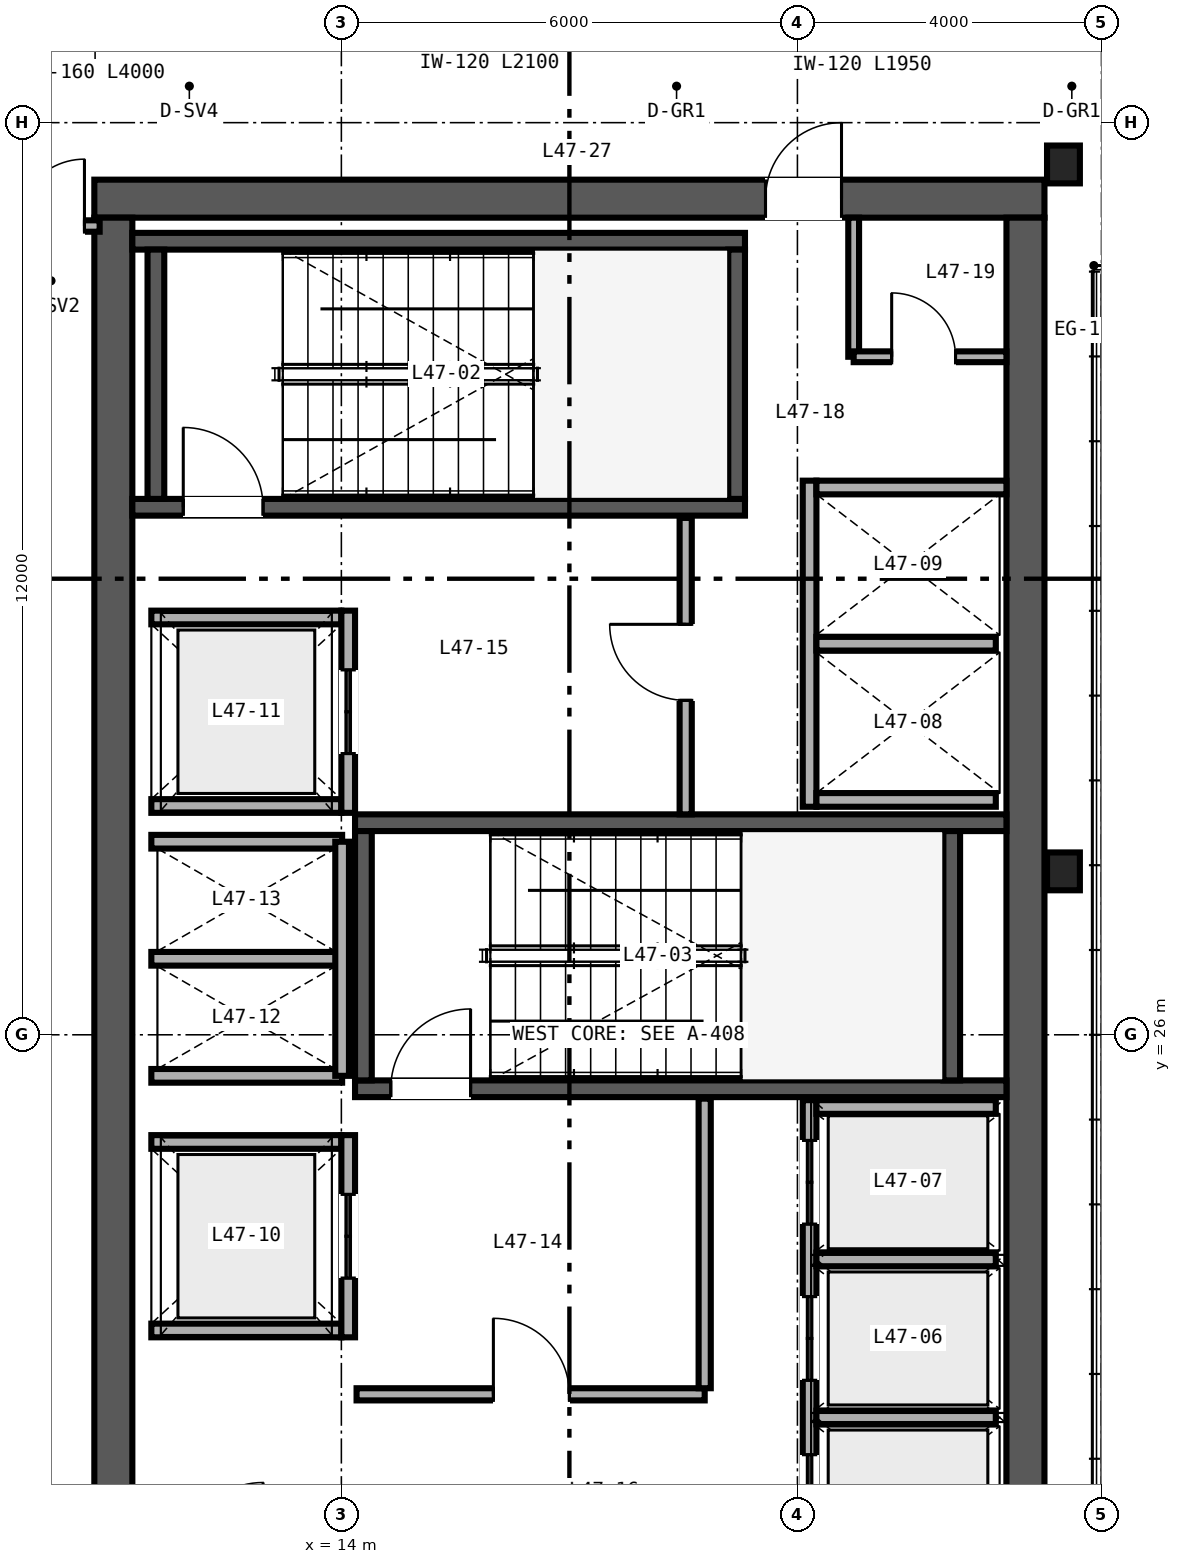
"""IFC4 building model, lengths in metres.
Left out: names, types, materials, properties, quantities, classifications, styles, units other than length and angle.
Written with IfcOpenShell. Run it as: python <this file> out.ifc"""

import sys

from ifc_helpers import new_model, si_unit, direction, frame, frame_2d, origin, origin_2d, place, context, subcontext, project, spatial, rectangle, i_section, extrude, source, transform, mapped, element, fill, save


model = new_model("IFC4")
c1 = context("Model", 3, precision=1e-05, world=origin(), true_north=direction((0.0, 1.0)))
c2 = subcontext(c1, "Body", "Model", "MODEL_VIEW")
j1 = project(units=[si_unit("LENGTHUNIT", "METRE"), si_unit("PLANEANGLEUNIT", "RADIAN")], contexts=[c1])
p1 = place(None, origin())
s1 = spatial("IfcSite", under=j1, at=p1, CompositionType="ELEMENT")
p2 = place(p1, origin())
s2 = spatial("IfcBuilding", under=s1, at=p2, CompositionType="ELEMENT")
p3 = place(p2, frame((0.0, 0.0, 188.4)))
s3 = spatial("IfcBuildingStorey", under=s2, at=p3, CompositionType="ELEMENT", Elevation=188.4)
p4 = place(p3, frame((10.75, 37.0, 0.0), z_axis=(0.0, 0.0, 1.0), x_axis=(1.0, 0.0, 0.0)))
e1 = element("IfcWall", 1, at=p4, inside=s3, PredefinedType="SHEAR", context=c2, shape_type="SweptSolid", body=[
    extrude(rectangle(XDim=12.5, YDim=0.5, at=frame_2d((6.25, 0.0))), origin(), (0.0, 0.0, 1.0), 3.37),
])
p5 = place(p4, frame((8.83, 0.0, 0.0)))
e2 = element("IfcOpeningElement", 2, at=p5, cuts=e1, PredefinedType="OPENING", context=c2, shape_type="SweptSolid", body=[
    extrude(rectangle(XDim=1.0, YDim=2.15, at=frame_2d((0.5, 1.075))), frame((0.0, 0.26, 0.0), z_axis=(0.0, -1.0, 0.0), x_axis=(1.0, 0.0, 0.0)), (0.0, 0.0, 1.0), 0.52),
])
for number, where, z_axis, x_axis in (
    (3, (11.0, 15.25, 0.0), (0.0, 0.0, 1.0), (0.0, 1.0, 0.0)),
    (4, (23.0, 15.25, 0.0), (0.0, 0.0, 1.0), (0.0, 1.0, 0.0)),
):
    element("IfcWall", number, at=place(p3, frame(where, z_axis=z_axis, x_axis=x_axis)), inside=s3, PredefinedType="SHEAR", context=c2, shape_type="SweptSolid", body=[
        extrude(rectangle(XDim=21.5, YDim=0.5, at=frame_2d((10.75, 0.0))), origin(), (0.0, 0.0, 1.0), 3.37),
    ])
p6 = place(p3, frame((11.25, 32.94, 0.0), z_axis=(0.0, 0.0, 1.0), x_axis=(1.0, 0.0, 0.0)))
e5 = element("IfcWall", 5, at=p6, inside=s3, PredefinedType="SHEAR", context=c2, shape_type="SweptSolid", body=[
    extrude(rectangle(XDim=8.06, YDim=0.22, at=frame_2d((4.03, 0.0))), origin(), (0.0, 0.0, 1.0), 3.4),
])
p7 = place(p6, frame((0.67, 0.0, 0.0)))
e6 = element("IfcOpeningElement", 6, at=p7, cuts=e5, PredefinedType="OPENING", context=c2, shape_type="SweptSolid", body=[
    extrude(rectangle(XDim=1.05, YDim=2.15, at=frame_2d((0.525, 1.075))), frame((0.0, 0.12, 0.0), z_axis=(0.0, -1.0, 0.0), x_axis=(1.0, 0.0, 0.0)), (0.0, 0.0, 1.0), 0.24),
])
p8 = place(p3, frame((11.25, 36.44, 0.0), z_axis=(0.0, 0.0, 1.0), x_axis=(1.0, 0.0, 0.0)))
e7 = element("IfcWall", 7, at=p8, inside=s3, PredefinedType="SHEAR", context=c2, shape_type="SweptSolid", body=[
    extrude(rectangle(XDim=8.06, YDim=0.22, at=frame_2d((4.03, 0.0))), origin(), (0.0, 0.0, 1.0), 3.4),
])
for number, where, z_axis, x_axis in (
    (8, (11.56, 33.05, 0.0), (0.0, 0.0, 1.0), (0.0, 1.0, 0.0)),
    (9, (19.2, 33.05, 0.0), (0.0, 0.0, 1.0), (0.0, 1.0, 0.0)),
):
    element("IfcWall", number, at=place(p3, frame(where, z_axis=z_axis, x_axis=x_axis)), inside=s3, PredefinedType="SHEAR", context=c2, shape_type="SweptSolid", body=[
        extrude(rectangle(XDim=3.28, YDim=0.22, at=frame_2d((1.64, 0.0))), origin(), (0.0, 0.0, 1.0), 3.4),
    ])
p9 = place(p3, frame((14.18, 25.29, 0.0), z_axis=(0.0, 0.0, 1.0), x_axis=(1.0, 0.0, 0.0)))
e10 = element("IfcWall", 10, at=p9, inside=s3, PredefinedType="SHEAR", context=c2, shape_type="SweptSolid", body=[
    extrude(rectangle(XDim=8.57, YDim=0.22, at=frame_2d((4.285, 0.0))), origin(), (0.0, 0.0, 1.0), 3.4),
])
p10 = place(p9, frame((0.47, 0.0, 0.0)))
e11 = element("IfcOpeningElement", 11, at=p10, cuts=e10, PredefinedType="OPENING", context=c2, shape_type="SweptSolid", body=[
    extrude(rectangle(XDim=1.05, YDim=2.15, at=frame_2d((0.525, 1.075))), frame((0.0, 0.12, 0.0), z_axis=(0.0, -1.0, 0.0), x_axis=(1.0, 0.0, 0.0)), (0.0, 0.0, 1.0), 0.24),
])
p11 = place(p3, frame((14.18, 28.79, 0.0), z_axis=(0.0, 0.0, 1.0), x_axis=(1.0, 0.0, 0.0)))
e12 = element("IfcWall", 12, at=p11, inside=s3, PredefinedType="SHEAR", context=c2, shape_type="SweptSolid", body=[
    extrude(rectangle(XDim=8.57, YDim=0.22, at=frame_2d((4.285, 0.0))), origin(), (0.0, 0.0, 1.0), 3.4),
])
for number, where, z_axis, x_axis in (
    (13, (14.29, 25.4, 0.0), (0.0, 0.0, 1.0), (0.0, 1.0, 0.0)),
    (14, (22.03, 25.4, 0.0), (0.0, 0.0, 1.0), (0.0, 1.0, 0.0)),
):
    element("IfcWall", number, at=place(p3, frame(where, z_axis=z_axis, x_axis=x_axis)), inside=s3, PredefinedType="SHEAR", context=c2, shape_type="SweptSolid", body=[
        extrude(rectangle(XDim=3.28, YDim=0.22, at=frame_2d((1.64, 0.0))), origin(), (0.0, 0.0, 1.0), 3.4),
    ])
m1 = source(origin(), c2, "Body", "SweptSolid", [
    extrude(i_section(OverallWidth=0.432, OverallDepth=0.498, WebThickness=0.056, FlangeThickness=0.089, FilletRadius=0.025, at=origin_2d()), origin(), (0.0, 0.0, 1.0), 3.37),
])
for number, where, z_axis, x_axis in (
    (15, (23.5, 28.15, 0.0), (0.0, 0.0, 1.0), (1.0, 0.0, 0.0)),
    (16, (23.5, 37.45, 0.0), (0.0, 0.0, 1.0), (1.0, 0.0, 0.0)),
):
    element("IfcColumn", number, at=place(p3, frame(where, z_axis=z_axis, x_axis=x_axis)), inside=s3, PredefinedType="COLUMN", context=c2, shape_type="MappedRepresentation", body=[
        mapped(m1, transform((0.0, 0.0, 0.0), scale=1.0)),
    ])
p12 = place(p3, frame((20.16, 18.82, 0.0), z_axis=(0.0, 0.0, 1.0), x_axis=(0.0, 1.0, 0.0)))
e17 = element("IfcWall", 17, at=p12, inside=s3, PredefinedType="SOLIDWALL", context=c2, shape_type="SweptSolid", body=[
    extrude(rectangle(XDim=6.32, YDim=0.18, at=frame_2d((3.16, 0.0))), origin(), (0.0, 0.0, 1.0), 2.47),
])
p13 = place(p12, frame((0.555, 0.0, 0.0)))
e18 = element("IfcOpeningElement", 18, at=p13, cuts=e17, PredefinedType="OPENING", context=c2, shape_type="SweptSolid", body=[
    extrude(rectangle(XDim=1.1, YDim=2.2, at=frame_2d((0.55, 1.1))), frame((0.0, 0.1, 0.0), z_axis=(0.0, -1.0, 0.0), x_axis=(1.0, 0.0, 0.0)), (0.0, 0.0, 1.0), 0.2),
])
p14 = place(p12, frame((2.635, 0.0, 0.0)))
e19 = element("IfcOpeningElement", 19, at=p14, cuts=e17, PredefinedType="OPENING", context=c2, shape_type="SweptSolid", body=[
    extrude(rectangle(XDim=1.1, YDim=2.2, at=frame_2d((0.55, 1.1))), frame((0.0, 0.1, 0.0), z_axis=(0.0, -1.0, 0.0), x_axis=(1.0, 0.0, 0.0)), (0.0, 0.0, 1.0), 0.2),
])
p15 = place(p12, frame((4.69, 0.0, 0.0)))
e20 = element("IfcOpeningElement", 20, at=p15, cuts=e17, PredefinedType="OPENING", context=c2, shape_type="SweptSolid", body=[
    extrude(rectangle(XDim=1.1, YDim=2.2, at=frame_2d((0.55, 1.1))), frame((0.0, 0.1, 0.0), z_axis=(0.0, -1.0, 0.0), x_axis=(1.0, 0.0, 0.0)), (0.0, 0.0, 1.0), 0.2),
])
p16 = place(p3, frame((20.25, 25.05, 0.0), z_axis=(0.0, 0.0, 1.0), x_axis=(1.0, 0.0, 0.0)))
e21 = element("IfcWall", 21, at=p16, inside=s3, PredefinedType="SOLIDWALL", context=c2, shape_type="SweptSolid", body=[
    extrude(rectangle(XDim=2.36, YDim=0.18, at=frame_2d((1.18, 0.0))), origin(), (0.0, 0.0, 1.0), 3.37),
])
p17 = place(p3, frame((20.25, 20.965, 0.0), z_axis=(0.0, 0.0, 1.0), x_axis=(1.0, 0.0, 0.0)))
e22 = element("IfcWall", 22, at=p17, inside=s3, PredefinedType="SOLIDWALL", context=c2, shape_type="SweptSolid", body=[
    extrude(rectangle(XDim=2.36, YDim=0.18, at=frame_2d((1.18, 0.0))), origin(), (0.0, 0.0, 1.0), 2.47),
])
p18 = place(p3, frame((20.25, 23.045, 0.0), z_axis=(0.0, 0.0, 1.0), x_axis=(1.0, 0.0, 0.0)))
e23 = element("IfcWall", 23, at=p18, inside=s3, PredefinedType="SOLIDWALL", context=c2, shape_type="SweptSolid", body=[
    extrude(rectangle(XDim=2.36, YDim=0.18, at=frame_2d((1.18, 0.0))), origin(), (0.0, 0.0, 1.0), 3.37),
])
p19 = place(p3, frame((20.16, 29.0, 0.0), z_axis=(0.0, 0.0, 1.0), x_axis=(0.0, 1.0, 0.0)))
e24 = element("IfcWall", 24, at=p19, inside=s3, PredefinedType="SOLIDWALL", context=c2, shape_type="SweptSolid", body=[
    extrude(rectangle(XDim=4.29, YDim=0.18, at=frame_2d((2.145, 0.0))), origin(), (0.0, 0.0, 1.0), 3.37),
])
p20 = place(p3, frame((20.25, 29.09, 0.0), z_axis=(0.0, 0.0, 1.0), x_axis=(1.0, 0.0, 0.0)))
e25 = element("IfcWall", 25, at=p20, inside=s3, PredefinedType="SOLIDWALL", context=c2, shape_type="SweptSolid", body=[
    extrude(rectangle(XDim=2.36, YDim=0.18, at=frame_2d((1.18, 0.0))), origin(), (0.0, 0.0, 1.0), 3.37),
])
p21 = place(p3, frame((20.25, 33.2, 0.0), z_axis=(0.0, 0.0, 1.0), x_axis=(1.0, 0.0, 0.0)))
e26 = element("IfcWall", 26, at=p21, inside=s3, PredefinedType="SOLIDWALL", context=c2, shape_type="SweptSolid", body=[
    extrude(rectangle(XDim=2.5, YDim=0.18, at=frame_2d((1.25, 0.0))), origin(), (0.0, 0.0, 1.0), 3.37),
])
p22 = place(p3, frame((20.25, 31.145, 0.0), z_axis=(0.0, 0.0, 1.0), x_axis=(1.0, 0.0, 0.0)))
e27 = element("IfcWall", 27, at=p22, inside=s3, PredefinedType="SOLIDWALL", context=c2, shape_type="SweptSolid", body=[
    extrude(rectangle(XDim=2.36, YDim=0.18, at=frame_2d((1.18, 0.0))), origin(), (0.0, 0.0, 1.0), 3.37),
])
for number, where, z_axis, x_axis in (
    (28, (11.5, 22.11, 0.0), (0.0, 0.0, 1.0), (1.0, 0.0, 0.0)),
    (29, (11.5, 24.59, 0.0), (0.0, 0.0, 1.0), (1.0, 0.0, 0.0)),
):
    element("IfcWall", number, at=place(p3, frame(where, z_axis=z_axis, x_axis=x_axis)), inside=s3, PredefinedType="SOLIDWALL", context=c2, shape_type="SweptSolid", body=[
        extrude(rectangle(XDim=2.5, YDim=0.18, at=frame_2d((1.25, 0.0))), origin(), (0.0, 0.0, 1.0), 3.37),
    ])
p23 = place(p3, frame((14.09, 22.02, 0.0), z_axis=(0.0, 0.0, 1.0), x_axis=(0.0, 1.0, 0.0)))
e30 = element("IfcWall", 30, at=p23, inside=s3, PredefinedType="SOLIDWALL", context=c2, shape_type="SweptSolid", body=[
    extrude(rectangle(XDim=2.66, YDim=0.18, at=frame_2d((1.33, 0.0))), origin(), (0.0, 0.0, 1.0), 3.37),
])
p24 = place(p23, frame((0.78, 0.0, 0.0)))
e31 = element("IfcOpeningElement", 31, at=p24, cuts=e30, PredefinedType="OPENING", context=c2, shape_type="SweptSolid", body=[
    extrude(rectangle(XDim=1.1, YDim=2.2, at=frame_2d((0.55, 1.1))), frame((0.0, 0.1, 0.0), z_axis=(0.0, -1.0, 0.0), x_axis=(1.0, 0.0, 0.0)), (0.0, 0.0, 1.0), 0.2),
])
for number, where, z_axis, x_axis in (
    (32, (11.5, 29.01, 0.0), (0.0, 0.0, 1.0), (1.0, 0.0, 0.0)),
    (33, (11.5, 31.49, 0.0), (0.0, 0.0, 1.0), (1.0, 0.0, 0.0)),
):
    element("IfcWall", number, at=place(p3, frame(where, z_axis=z_axis, x_axis=x_axis)), inside=s3, PredefinedType="SOLIDWALL", context=c2, shape_type="SweptSolid", body=[
        extrude(rectangle(XDim=2.5, YDim=0.18, at=frame_2d((1.25, 0.0))), origin(), (0.0, 0.0, 1.0), 3.37),
    ])
p25 = place(p3, frame((14.09, 28.92, 0.0), z_axis=(0.0, 0.0, 1.0), x_axis=(0.0, 1.0, 0.0)))
e34 = element("IfcWall", 34, at=p25, inside=s3, PredefinedType="SOLIDWALL", context=c2, shape_type="SweptSolid", body=[
    extrude(rectangle(XDim=2.66, YDim=0.18, at=frame_2d((1.33, 0.0))), origin(), (0.0, 0.0, 1.0), 3.37),
])
p26 = place(p25, frame((0.78, 0.0, 0.0)))
e35 = element("IfcOpeningElement", 35, at=p26, cuts=e34, PredefinedType="OPENING", context=c2, shape_type="SweptSolid", body=[
    extrude(rectangle(XDim=1.1, YDim=2.2, at=frame_2d((0.55, 1.1))), frame((0.0, 0.1, 0.0), z_axis=(0.0, -1.0, 0.0), x_axis=(1.0, 0.0, 0.0)), (0.0, 0.0, 1.0), 0.2),
])
for number, where, z_axis, x_axis in (
    (36, (11.5, 25.46, 0.0), (0.0, 0.0, 1.0), (1.0, 0.0, 0.0)),
    (37, (11.5, 27.0, 0.0), (0.0, 0.0, 1.0), (1.0, 0.0, 0.0)),
    (38, (11.5, 28.54, 0.0), (0.0, 0.0, 1.0), (1.0, 0.0, 0.0)),
):
    element("IfcWall", number, at=place(p3, frame(where, z_axis=z_axis, x_axis=x_axis)), inside=s3, PredefinedType="SOLIDWALL", context=c2, shape_type="SweptSolid", body=[
        extrude(rectangle(XDim=2.51, YDim=0.18, at=frame_2d((1.255, 0.0))), origin(), (0.0, 0.0, 1.0), 3.37),
    ])
p27 = place(p3, frame((14.01, 25.46, 0.0), z_axis=(0.0, 0.0, 1.0), x_axis=(0.0, 1.0, 0.0)))
e39 = element("IfcWall", 39, at=p27, inside=s3, PredefinedType="SOLIDWALL", context=c2, shape_type="SweptSolid", body=[
    extrude(rectangle(XDim=3.08, YDim=0.18, at=frame_2d((1.54, 0.0))), origin(), (0.0, 0.0, 1.0), 3.37),
])
p28 = place(p3, frame((14.2, 21.27, 0.0), z_axis=(0.0, 0.0, 1.0), x_axis=(1.0, 0.0, 0.0)))
e40 = element("IfcWall", 40, at=p28, inside=s3, PredefinedType="PARTITIONING", context=c2, shape_type="SweptSolid", body=[
    extrude(rectangle(XDim=4.58, YDim=0.16, at=frame_2d((2.29, 0.0))), origin(), (0.0, 0.0, 1.0), 3.37),
])
p29 = place(p28, frame((1.8, 0.0, 0.0)))
e41 = element("IfcOpeningElement", 41, at=p29, cuts=e40, PredefinedType="OPENING", context=c2, shape_type="SweptSolid", body=[
    extrude(rectangle(XDim=1.0, YDim=2.15, at=frame_2d((0.5, 1.075))), frame((0.0, 0.09, 0.0), z_axis=(0.0, -1.0, 0.0), x_axis=(1.0, 0.0, 0.0)), (0.0, 0.0, 1.0), 0.18),
])
p30 = place(p3, frame((18.78, 21.35, 0.0), z_axis=(0.0, 0.0, 1.0), x_axis=(0.0, 1.0, 0.0)))
e42 = element("IfcWall", 42, at=p30, inside=s3, PredefinedType="PARTITIONING", context=c2, shape_type="SweptSolid", body=[
    extrude(rectangle(XDim=3.81, YDim=0.16, at=frame_2d((1.905, 0.0))), origin(), (0.0, 0.0, 1.0), 3.37),
])
p31 = place(p3, frame((18.53, 28.9, 0.0), z_axis=(0.0, 0.0, 1.0), x_axis=(0.0, 1.0, 0.0)))
e43 = element("IfcWall", 43, at=p31, inside=s3, PredefinedType="PARTITIONING", context=c2, shape_type="SweptSolid", body=[
    extrude(rectangle(XDim=3.9, YDim=0.16, at=frame_2d((1.95, 0.0))), origin(), (0.0, 0.0, 1.0), 3.37),
])
p32 = place(p31, frame((1.5, 0.0, 0.0)))
e44 = element("IfcOpeningElement", 44, at=p32, cuts=e43, PredefinedType="OPENING", context=c2, shape_type="SweptSolid", body=[
    extrude(rectangle(XDim=1.0, YDim=2.15, at=frame_2d((0.5, 1.075))), frame((0.0, 0.09, 0.0), z_axis=(0.0, -1.0, 0.0), x_axis=(1.0, 0.0, 0.0)), (0.0, 0.0, 1.0), 0.18),
])
p33 = place(p3, frame((20.74, 34.92, 0.0), z_axis=(0.0, 0.0, 1.0), x_axis=(0.0, 1.0, 0.0)))
e45 = element("IfcWall", 45, at=p33, inside=s3, PredefinedType="PARTITIONING", context=c2, shape_type="SweptSolid", body=[
    extrude(rectangle(XDim=1.83, YDim=0.142, at=frame_2d((0.915, 0.0))), origin(), (0.0, 0.0, 1.0), 3.37),
])
p34 = place(p3, frame((20.74, 34.92, 0.0), z_axis=(0.0, 0.0, 1.0), x_axis=(1.0, 0.0, 0.0)))
e46 = element("IfcWall", 46, at=p34, inside=s3, PredefinedType="PARTITIONING", context=c2, shape_type="SweptSolid", body=[
    extrude(rectangle(XDim=2.01, YDim=0.142, at=frame_2d((1.005, 0.0))), origin(), (0.0, 0.0, 1.0), 3.37),
])
p35 = place(p34, frame((0.5, 0.0, 0.0)))
e47 = element("IfcOpeningElement", 47, at=p35, cuts=e46, PredefinedType="OPENING", context=c2, shape_type="SweptSolid", body=[
    extrude(rectangle(XDim=0.84, YDim=2.1, at=frame_2d((0.42, 1.05))), frame((0.0, 0.081, 0.0), z_axis=(0.0, -1.0, 0.0), x_axis=(1.0, 0.0, 0.0)), (0.0, 0.0, 1.0), 0.162),
])
p36 = place(p3, frame((8.16, 36.64, 0.0), z_axis=(0.0, 0.0, 1.0), x_axis=(1.0, 0.0, 0.0)))
e48 = element("IfcWall", 48, at=p36, inside=s3, PredefinedType="PARTITIONING", context=c2, shape_type="SweptSolid", body=[
    extrude(rectangle(XDim=2.66, YDim=0.15, at=frame_2d((1.33, 0.0))), origin(), (0.0, 0.0, 1.0), 2.753),
])
p37 = place(p36, frame((1.58, 0.0, 0.0)))
e49 = element("IfcOpeningElement", 49, at=p37, cuts=e48, PredefinedType="OPENING", context=c2, shape_type="SweptSolid", body=[
    extrude(rectangle(XDim=0.88, YDim=2.15, at=frame_2d((0.44, 1.075))), frame((0.0, 0.085, 0.0), z_axis=(0.0, -1.0, 0.0), x_axis=(1.0, 0.0, 0.0)), (0.0, 0.0, 1.0), 0.17),
])
m2 = source(origin(), c2, "Body", "SweptSolid", [
    extrude(rectangle(XDim=1.05, YDim=2.15, at=frame_2d((0.525, 1.075))), frame((0.0, 0.025, 0.0), z_axis=(0.0, -1.0, 0.0), x_axis=(1.0, 0.0, 0.0)), (0.0, 0.0, 1.0), 0.05),
])
p38 = place(p7, origin())
e50 = element("IfcDoor", 50, at=p38, inside=s3, OperationType="SINGLE_SWING_LEFT", PredefinedType="DOOR", context=c2, shape_type="MappedRepresentation", body=[
    mapped(m2, transform((0.0, 0.0, 0.0), scale=1.0)),
])
fill(e6, e50)
p39 = place(p10, origin())
e51 = element("IfcDoor", 51, at=p39, inside=s3, OperationType="SINGLE_SWING_RIGHT", PredefinedType="DOOR", context=c2, shape_type="MappedRepresentation", body=[
    mapped(m2, transform((0.0, 0.0, 0.0), scale=1.0)),
])
fill(e11, e51)
m3 = source(origin(), c2, "Body", "SweptSolid", [
    extrude(rectangle(XDim=1.1, YDim=2.2, at=frame_2d((0.55, 1.1))), frame((0.0, 0.025, 0.0), z_axis=(0.0, -1.0, 0.0), x_axis=(1.0, 0.0, 0.0)), (0.0, 0.0, 1.0), 0.05),
])
p40 = place(p13, origin())
e52 = element("IfcDoor", 52, at=p40, inside=s3, OperationType="DOUBLE_DOOR_SLIDING", PredefinedType="DOOR", context=c2, shape_type="MappedRepresentation", body=[
    mapped(m3, transform((0.0, 0.0, 0.0), scale=1.0)),
])
fill(e18, e52)
p41 = place(p14, origin())
e53 = element("IfcDoor", 53, at=p41, inside=s3, OperationType="DOUBLE_DOOR_SLIDING", PredefinedType="DOOR", context=c2, shape_type="MappedRepresentation", body=[
    mapped(m3, transform((0.0, 0.0, 0.0), scale=1.0)),
])
fill(e19, e53)
p42 = place(p15, origin())
e54 = element("IfcDoor", 54, at=p42, inside=s3, OperationType="DOUBLE_DOOR_SLIDING", PredefinedType="DOOR", context=c2, shape_type="MappedRepresentation", body=[
    mapped(m3, transform((0.0, 0.0, 0.0), scale=1.0)),
])
fill(e20, e54)
p43 = place(p24, origin())
e55 = element("IfcDoor", 55, at=p43, inside=s3, OperationType="DOUBLE_DOOR_SLIDING", PredefinedType="DOOR", context=c2, shape_type="MappedRepresentation", body=[
    mapped(m3, transform((0.0, 0.0, 0.0), scale=1.0)),
])
fill(e31, e55)
p44 = place(p26, origin())
e56 = element("IfcDoor", 56, at=p44, inside=s3, OperationType="DOUBLE_DOOR_SLIDING", PredefinedType="DOOR", context=c2, shape_type="MappedRepresentation", body=[
    mapped(m3, transform((0.0, 0.0, 0.0), scale=1.0)),
])
fill(e35, e56)
m4 = source(origin(), c2, "Body", "SweptSolid", [
    extrude(rectangle(XDim=1.0, YDim=2.15, at=frame_2d((0.5, 1.075))), frame((0.0, 0.025, 0.0), z_axis=(0.0, -1.0, 0.0), x_axis=(1.0, 0.0, 0.0)), (0.0, 0.0, 1.0), 0.05),
])
p45 = place(p29, origin())
e57 = element("IfcDoor", 57, at=p45, inside=s3, OperationType="SINGLE_SWING_LEFT", PredefinedType="DOOR", context=c2, shape_type="MappedRepresentation", body=[
    mapped(m4, transform((0.0, 0.0, 0.0), scale=1.0)),
])
fill(e41, e57)
p46 = place(p32, origin())
e58 = element("IfcDoor", 58, at=p46, inside=s3, OperationType="SINGLE_SWING_RIGHT", PredefinedType="DOOR", context=c2, shape_type="MappedRepresentation", body=[
    mapped(m4, transform((0.0, 0.0, 0.0), scale=1.0)),
])
fill(e44, e58)
m5 = source(origin(), c2, "Body", "SweptSolid", [
    extrude(rectangle(XDim=0.84, YDim=2.1, at=frame_2d((0.42, 1.05))), frame((0.0, 0.025, 0.0), z_axis=(0.0, -1.0, 0.0), x_axis=(1.0, 0.0, 0.0)), (0.0, 0.0, 1.0), 0.05),
])
p47 = place(p35, origin())
e59 = element("IfcDoor", 59, at=p47, inside=s3, OperationType="SINGLE_SWING_LEFT", PredefinedType="DOOR", context=c2, shape_type="MappedRepresentation", body=[
    mapped(m5, transform((0.0, 0.0, 0.0), scale=1.0)),
])
fill(e47, e59)
p48 = place(p5, origin())
e60 = element("IfcDoor", 60, at=p48, inside=s3, OperationType="SINGLE_SWING_RIGHT", PredefinedType="DOOR", context=c2, shape_type="MappedRepresentation", body=[
    mapped(m4, transform((0.0, 0.0, 0.0), scale=1.0)),
])
fill(e2, e60)
m6 = source(origin(), c2, "Body", "SweptSolid", [
    extrude(rectangle(XDim=0.88, YDim=2.15, at=frame_2d((0.44, 1.075))), frame((0.0, 0.025, 0.0), z_axis=(0.0, -1.0, 0.0), x_axis=(1.0, 0.0, 0.0)), (0.0, 0.0, 1.0), 0.05),
])
p49 = place(p37, origin())
e61 = element("IfcDoor", 61, at=p49, inside=s3, OperationType="SINGLE_SWING_RIGHT", PredefinedType="DOOR", context=c2, shape_type="MappedRepresentation", body=[
    mapped(m6, transform((0.0, 0.0, 0.0), scale=1.0)),
])
fill(e49, e61)
save(model, sys.argv[1])
